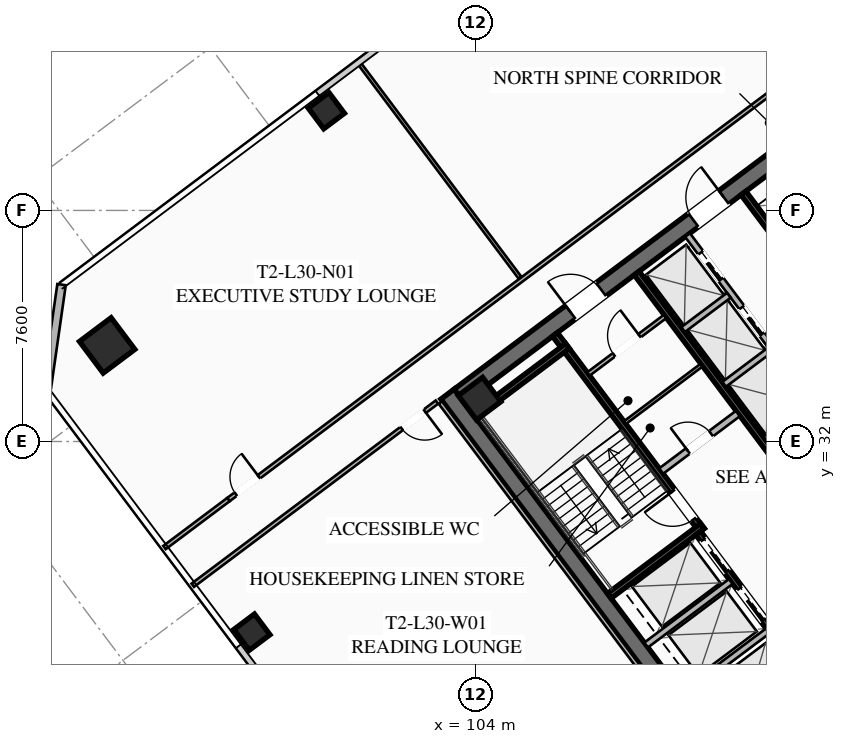
"""IFC4 building model, lengths in metres.
Left out: names, types, materials, properties, quantities, classifications, styles, units other than length and angle.
Written with IfcOpenShell. Run it as: python <this file> out.ifc"""

import sys

from ifc_helpers import new_model, si_unit, direction, frame, frame_2d, origin, origin_2d, place, context, subcontext, project, spatial, rectangle, hollow_rectangle, extrude, element, fill, save


model = new_model("IFC4")
c1 = context("Model", 3, precision=1e-05, world=origin(), true_north=direction((0.0, 1.0)))
c2 = subcontext(c1, "Body", "Model", "MODEL_VIEW")
j1 = project(units=[si_unit("LENGTHUNIT", "METRE"), si_unit("PLANEANGLEUNIT", "RADIAN")], contexts=[c1])
p1 = place(None, origin())
s1 = spatial("IfcSite", under=j1, at=p1, CompositionType="ELEMENT")
p2 = place(p1, origin())
s2 = spatial("IfcBuilding", under=s1, at=p2, CompositionType="ELEMENT")
p3 = place(p2, frame((0.0, 0.0, 114.4)))
s3 = spatial("IfcBuildingStorey", under=s2, at=p3, CompositionType="ELEMENT", Elevation=114.4)
p4 = place(p3, frame((112.436, 21.077, 0.0), z_axis=(0.0, 0.0, 1.0), x_axis=(-0.600005007985, 0.799996243986, 0.0)))
e1 = element("IfcWall", 1, at=p4, inside=s3, PredefinedType="SHEAR", context=c2, shape_type="SweptSolid", body=[
    extrude(rectangle(XDim=15.6, YDim=0.55, at=frame_2d((7.8, 0.0))), origin(), (0.0, 0.0, 1.0), 3.55),
])
p5 = place(p3, frame((124.539, 30.498, 0.0), z_axis=(0.0, 0.0, 1.0), x_axis=(-0.799998054672, -0.600002593761, 0.0)))
e2 = element("IfcWall", 2, at=p5, inside=s3, PredefinedType="SHEAR", context=c2, shape_type="SweptSolid", body=[
    extrude(rectangle(XDim=15.06, YDim=0.55, at=frame_2d((7.53, 0.0))), origin(), (0.0, 0.0, 1.0), 3.55),
])
p6 = place(p5, frame((9.23, 0.0, 0.0)))
e3 = element("IfcOpeningElement", 3, at=p6, cuts=e2, PredefinedType="OPENING", context=c2, shape_type="SweptSolid", body=[
    extrude(rectangle(XDim=1.25, YDim=2.25, at=frame_2d((0.625, 1.125))), frame((0.0, 0.285, 0.0), z_axis=(0.0, -1.0, 0.0), x_axis=(1.0, 0.0, 0.0)), (0.0, 0.0, 1.0), 0.57),
])
p7 = place(p5, frame((4.18, 0.0, 0.0)))
e4 = element("IfcOpeningElement", 4, at=p7, cuts=e2, PredefinedType="OPENING", context=c2, shape_type="SweptSolid", body=[
    extrude(rectangle(XDim=1.25, YDim=2.25, at=frame_2d((0.625, 1.125))), frame((0.0, 0.285, 0.0), z_axis=(0.0, -1.0, 0.0), x_axis=(1.0, 0.0, 0.0)), (0.0, 0.0, 1.0), 0.57),
])
p8 = place(p3, frame((103.461, 33.502, 0.0), z_axis=(0.0, 0.0, 1.0), x_axis=(0.799998054672, 0.600002593761, 0.0)))
e5 = element("IfcWall", 5, at=p8, inside=s3, PredefinedType="SHEAR", context=c2, shape_type="SweptSolid", body=[
    extrude(rectangle(XDim=15.06, YDim=0.55, at=frame_2d((7.53, 0.0))), origin(), (0.0, 0.0, 1.0), 3.55),
])
p9 = place(p8, frame((4.58, 0.0, 0.0)))
e6 = element("IfcOpeningElement", 6, at=p9, cuts=e5, PredefinedType="OPENING", context=c2, shape_type="SweptSolid", body=[
    extrude(rectangle(XDim=1.25, YDim=2.25, at=frame_2d((0.625, 1.125))), frame((0.0, 0.285, 0.0), z_axis=(0.0, -1.0, 0.0), x_axis=(1.0, 0.0, 0.0)), (0.0, 0.0, 1.0), 0.57),
])
p10 = place(p8, frame((9.63, 0.0, 0.0)))
e7 = element("IfcOpeningElement", 7, at=p10, cuts=e5, PredefinedType="OPENING", context=c2, shape_type="SweptSolid", body=[
    extrude(rectangle(XDim=1.25, YDim=2.25, at=frame_2d((0.625, 1.125))), frame((0.0, 0.285, 0.0), z_axis=(0.0, -1.0, 0.0), x_axis=(1.0, 0.0, 0.0)), (0.0, 0.0, 1.0), 0.57),
])
p11 = place(p3, frame((104.13, 33.41, 0.0), z_axis=(0.0, 0.0, 1.0), x_axis=(0.799999996291, 0.600000004945, 0.0)))
e8 = element("IfcColumn", 8, at=p11, inside=s3, PredefinedType="COLUMN", context=c2, shape_type="SweptSolid", body=[
    extrude(hollow_rectangle(XDim=1.0, YDim=1.0, WallThickness=0.04, at=origin_2d()), origin(), (0.0, 0.0, 1.0), 3.37),
])
p12 = place(p3, frame((91.88, 35.16, 0.0), z_axis=(0.0, 0.0, 1.0), x_axis=(0.799999996291, 0.600000004945, 0.0)))
e9 = element("IfcColumn", 9, at=p12, inside=s3, PredefinedType="COLUMN", context=c2, shape_type="SweptSolid", body=[
    extrude(hollow_rectangle(XDim=1.3, YDim=1.3, WallThickness=0.05, at=origin_2d()), origin(), (0.0, 0.0, 1.0), 3.37),
])
for number, where, z_axis, x_axis in (
    (10, (99.09, 42.88, 0.0), (0.0, 0.0, 1.0), (0.8, 0.6, 0.0)),
    (11, (96.64, 25.73, 0.0), (0.0, 0.0, 1.0), (0.8, 0.6, 0.0)),
):
    element("IfcColumn", number, at=place(p3, frame(where, z_axis=z_axis, x_axis=x_axis)), inside=s3, PredefinedType="COLUMN", context=c2, shape_type="SweptSolid", body=[
        extrude(hollow_rectangle(XDim=0.85, YDim=0.85, WallThickness=0.035, at=origin_2d()), origin(), (0.0, 0.0, 1.0), 3.37),
    ])
p13 = place(p3, frame((89.88, 33.66, 0.0), z_axis=(0.0, 0.0, 1.0), x_axis=(0.141421356237, 0.989949493661, 0.0)))
e12 = element("IfcWall", 12, at=p13, inside=s3, PredefinedType="SOLIDWALL", context=c2, shape_type="SweptSolid", body=[
    extrude(rectangle(XDim=3.536, YDim=0.28, at=frame_2d((1.768, 0.0))), origin(), (0.0, 0.0, 1.0), 3.37),
])
p14 = place(p3, frame((111.44, 29.08, 0.0), z_axis=(0.0, 0.0, 1.0), x_axis=(-0.59999029481, 0.8000072788, 0.0)))
e13 = element("IfcWall", 13, at=p14, inside=s3, PredefinedType="SHEAR", context=c2, shape_type="SweptSolid", body=[
    extrude(rectangle(XDim=8.05, YDim=0.2, at=frame_2d((4.025, 0.0))), origin(), (0.0, 0.0, 1.0), 3.37),
])
p15 = place(p14, frame((0.45, 0.0, 0.0)))
e14 = element("IfcOpeningElement", 14, at=p15, cuts=e13, PredefinedType="OPENING", context=c2, shape_type="SweptSolid", body=[
    extrude(rectangle(XDim=1.15, YDim=2.2, at=frame_2d((0.575, 1.1))), frame((0.0, 0.11, 0.0), z_axis=(0.0, -1.0, 0.0), x_axis=(1.0, 0.0, 0.0)), (0.0, 0.0, 1.0), 0.22),
])
for number, where, z_axis, x_axis in (
    (15, (108.396, 26.922, 0.0), (0.0, 0.0, 1.0), (0.8, 0.6, 0.0)),
    (16, (103.956, 32.842, 0.0), (0.0, 0.0, 1.0), (0.8, 0.6, 0.0)),
):
    element("IfcWall", number, at=place(p3, frame(where, z_axis=z_axis, x_axis=x_axis)), inside=s3, PredefinedType="SHEAR", context=c2, shape_type="SweptSolid", body=[
        extrude(rectangle(XDim=3.83, YDim=0.2, at=frame_2d((1.915, 0.0))), origin(), (0.0, 0.0, 1.0), 3.37),
    ])
p16 = place(p3, frame((117.998, 25.936, 0.0), z_axis=(0.0, 0.0, 1.0), x_axis=(-0.600002693989, 0.799997979501, 0.0)))
e17 = element("IfcWall", 17, at=p16, inside=s3, PredefinedType="SHEAR", context=c2, shape_type="SweptSolid", body=[
    extrude(rectangle(XDim=14.5, YDim=0.2, at=frame_2d((7.25, 0.0))), origin(), (0.0, 0.0, 1.0), 3.37),
])
p17 = place(p3, frame((110.104, 31.028, 0.0), z_axis=(0.0, 0.0, 1.0), x_axis=(0.800018601094, 0.59997519774, 0.0)))
e18 = element("IfcWall", 18, at=p17, inside=s3, PredefinedType="SOLIDWALL", context=c2, shape_type="SweptSolid", body=[
    extrude(rectangle(XDim=3.15, YDim=0.22, at=frame_2d((1.575, 0.0))), origin(), (0.0, 0.0, 1.0), 2.723),
])
p18 = place(p17, frame((1.1, 0.0, 0.0)))
e19 = element("IfcOpeningElement", 19, at=p18, cuts=e18, PredefinedType="OPENING", context=c2, shape_type="SweptSolid", body=[
    extrude(rectangle(XDim=0.95, YDim=2.05, at=frame_2d((0.475, 1.025))), frame((0.0, 0.12, 0.0), z_axis=(0.0, -1.0, 0.0), x_axis=(1.0, 0.0, 0.0)), (0.0, 0.0, 1.0), 0.24),
])
p19 = place(p3, frame((115.19, 23.83, 0.0), z_axis=(0.0, 0.0, 1.0), x_axis=(-0.599993943644, 0.800004542231, 0.0)))
e20 = element("IfcWall", 20, at=p19, inside=s3, PredefinedType="SHEAR", context=c2, shape_type="SweptSolid", body=[
    extrude(rectangle(XDim=6.45, YDim=0.2, at=frame_2d((3.225, 0.0))), origin(), (0.0, 0.0, 1.0), 3.37),
])
p20 = place(p19, frame((4.875, 0.0, 0.0)))
e21 = element("IfcOpeningElement", 21, at=p20, cuts=e20, PredefinedType="OPENING", context=c2, shape_type="SweptSolid", body=[
    extrude(rectangle(XDim=1.3, YDim=2.25, at=frame_2d((0.65, 1.125))), frame((0.0, 0.11, 0.0), z_axis=(0.0, -1.0, 0.0), x_axis=(1.0, 0.0, 0.0)), (0.0, 0.0, 1.0), 0.22),
])
p21 = place(p19, frame((2.875, 0.0, 0.0)))
e22 = element("IfcOpeningElement", 22, at=p21, cuts=e20, PredefinedType="OPENING", context=c2, shape_type="SweptSolid", body=[
    extrude(rectangle(XDim=1.3, YDim=2.25, at=frame_2d((0.65, 1.125))), frame((0.0, 0.11, 0.0), z_axis=(0.0, -1.0, 0.0), x_axis=(1.0, 0.0, 0.0)), (0.0, 0.0, 1.0), 0.22),
])
p22 = place(p19, frame((0.675, 0.0, 0.0)))
e23 = element("IfcOpeningElement", 23, at=p22, cuts=e20, PredefinedType="OPENING", context=c2, shape_type="SweptSolid", body=[
    extrude(rectangle(XDim=1.3, YDim=2.25, at=frame_2d((0.65, 1.125))), frame((0.0, 0.11, 0.0), z_axis=(0.0, -1.0, 0.0), x_axis=(1.0, 0.0, 0.0)), (0.0, 0.0, 1.0), 0.22),
])
for number, where, z_axis, x_axis in (
    (24, (110.826, 23.682, 0.0), (0.0, 0.0, 1.0), (0.8, 0.6, 0.0)),
    (25, (109.608, 25.306, 0.0), (0.0, 0.0, 1.0), (0.8, 0.6, 0.0)),
):
    element("IfcWall", number, at=place(p3, frame(where, z_axis=z_axis, x_axis=x_axis)), inside=s3, PredefinedType="SOLIDWALL", context=c2, shape_type="SweptSolid", body=[
        extrude(rectangle(XDim=3.48, YDim=0.2, at=frame_2d((1.74, 0.0))), origin(), (0.0, 0.0, 1.0), 3.37),
    ])
p23 = place(p3, frame((112.81, 40.17, 0.0), z_axis=(0.0, 0.0, 1.0), x_axis=(0.599993943644, -0.800004542231, 0.0)))
e26 = element("IfcWall", 26, at=p23, inside=s3, PredefinedType="SHEAR", context=c2, shape_type="SweptSolid", body=[
    extrude(rectangle(XDim=6.45, YDim=0.2, at=frame_2d((3.225, 0.0))), origin(), (0.0, 0.0, 1.0), 3.37),
])
p24 = place(p3, frame((107.71, 34.22, 0.0), z_axis=(0.0, 0.0, 1.0), x_axis=(0.799981399002, 0.60002480053, 0.0)))
e27 = element("IfcWall", 27, at=p24, inside=s3, PredefinedType="PARTITIONING", context=c2, shape_type="SweptSolid", body=[
    extrude(rectangle(XDim=3.15, YDim=0.135, at=frame_2d((1.575, 0.0))), origin(), (0.0, 0.0, 1.0), 2.723),
])
p25 = place(p24, frame((1.05, 0.0, 0.0)))
e28 = element("IfcOpeningElement", 28, at=p25, cuts=e27, PredefinedType="OPENING", context=c2, shape_type="SweptSolid", body=[
    extrude(rectangle(XDim=1.05, YDim=2.2, at=frame_2d((0.525, 1.1))), frame((0.0, 0.077, 0.0), z_axis=(0.0, -1.0, 0.0), x_axis=(1.0, 0.0, 0.0)), (0.0, 0.0, 1.0), 0.155),
])
p26 = place(p3, frame((108.91, 32.62, 0.0), z_axis=(0.0, 0.0, 1.0), x_axis=(0.800018601094, 0.59997519774, 0.0)))
e29 = element("IfcWall", 29, at=p26, inside=s3, PredefinedType="PARTITIONING", context=c2, shape_type="SweptSolid", body=[
    extrude(rectangle(XDim=3.15, YDim=0.11, at=frame_2d((1.575, 0.0))), origin(), (0.0, 0.0, 1.0), 2.723),
])
p27 = place(p3, frame((115.11, 33.27, 0.0), z_axis=(0.0, 0.0, 1.0), x_axis=(-0.600011322243, 0.799991508192, 0.0)))
e30 = element("IfcWall", 30, at=p27, inside=s3, PredefinedType="SOLIDWALL", context=c2, shape_type="SweptSolid", body=[
    extrude(rectangle(XDim=6.9, YDim=0.2, at=frame_2d((3.45, 0.0))), origin(), (0.0, 0.0, 1.0), 3.37),
])
p28 = place(p27, frame((0.575, 0.0, 0.0)))
e31 = element("IfcOpeningElement", 31, at=p28, cuts=e30, PredefinedType="OPENING", context=c2, shape_type="SweptSolid", body=[
    extrude(rectangle(XDim=1.1, YDim=2.2, at=frame_2d((0.55, 1.1))), frame((0.0, 0.11, 0.0), z_axis=(0.0, -1.0, 0.0), x_axis=(1.0, 0.0, 0.0)), (0.0, 0.0, 1.0), 0.22),
])
p29 = place(p27, frame((2.825, 0.0, 0.0)))
e32 = element("IfcOpeningElement", 32, at=p29, cuts=e30, PredefinedType="OPENING", context=c2, shape_type="SweptSolid", body=[
    extrude(rectangle(XDim=1.1, YDim=2.2, at=frame_2d((0.55, 1.1))), frame((0.0, 0.11, 0.0), z_axis=(0.0, -1.0, 0.0), x_axis=(1.0, 0.0, 0.0)), (0.0, 0.0, 1.0), 0.22),
])
p30 = place(p27, frame((5.075, 0.0, 0.0)))
e33 = element("IfcOpeningElement", 33, at=p30, cuts=e30, PredefinedType="OPENING", context=c2, shape_type="SweptSolid", body=[
    extrude(rectangle(XDim=1.1, YDim=2.2, at=frame_2d((0.55, 1.1))), frame((0.0, 0.11, 0.0), z_axis=(0.0, -1.0, 0.0), x_axis=(1.0, 0.0, 0.0)), (0.0, 0.0, 1.0), 0.22),
])
p31 = place(p3, frame((113.526, 32.082, 0.0), z_axis=(0.0, 0.0, 1.0), x_axis=(0.800046745961, 0.599937666993, 0.0)))
e34 = element("IfcWall", 34, at=p31, inside=s3, PredefinedType="SOLIDWALL", context=c2, shape_type="SweptSolid", body=[
    extrude(rectangle(XDim=1.88, YDim=0.2, at=frame_2d((0.94, 0.0))), origin(), (0.0, 0.0, 1.0), 3.37),
])
p32 = place(p3, frame((112.176, 33.882, 0.0), z_axis=(0.0, 0.0, 1.0), x_axis=(0.8, 0.6, 0.0)))
e35 = element("IfcWall", 35, at=p32, inside=s3, PredefinedType="SOLIDWALL", context=c2, shape_type="SweptSolid", body=[
    extrude(rectangle(XDim=1.88, YDim=0.2, at=frame_2d((0.94, 0.0))), origin(), (0.0, 0.0, 1.0), 3.37),
])
p33 = place(p3, frame((110.826, 35.682, 0.0), z_axis=(0.0, 0.0, 1.0), x_axis=(0.799984418148, 0.600020775241, 0.0)))
e36 = element("IfcWall", 36, at=p33, inside=s3, PredefinedType="SOLIDWALL", context=c2, shape_type="SweptSolid", body=[
    extrude(rectangle(XDim=1.88, YDim=0.2, at=frame_2d((0.94, 0.0))), origin(), (0.0, 0.0, 1.0), 3.37),
])
p34 = place(p3, frame((95.87, 30.09, 0.0), z_axis=(0.0, 0.0, 1.0), x_axis=(0.799997191971, 0.600003744021, 0.0)))
e37 = element("IfcWall", 37, at=p34, inside=s3, PredefinedType="PARTITIONING", context=c2, shape_type="SweptSolid", body=[
    extrude(rectangle(XDim=31.3, YDim=0.135, at=frame_2d((15.65, 0.0))), origin(), (0.0, 0.0, 1.0), 2.723),
])
p35 = place(p34, frame((0.3, 0.0, 0.0)))
e38 = element("IfcOpeningElement", 38, at=p35, cuts=e37, PredefinedType="OPENING", context=c2, shape_type="SweptSolid", body=[
    extrude(rectangle(XDim=0.95, YDim=2.05, at=frame_2d((0.475, 1.025))), frame((0.0, 0.077, 0.0), z_axis=(0.0, -1.0, 0.0), x_axis=(1.0, 0.0, 0.0)), (0.0, 0.0, 1.0), 0.155),
])
p36 = place(p34, frame((30.05, 0.0, 0.0)))
e39 = element("IfcOpeningElement", 39, at=p36, cuts=e37, PredefinedType="OPENING", context=c2, shape_type="SweptSolid", body=[
    extrude(rectangle(XDim=0.95, YDim=2.05, at=frame_2d((0.475, 1.025))), frame((0.0, 0.077, 0.0), z_axis=(0.0, -1.0, 0.0), x_axis=(1.0, 0.0, 0.0)), (0.0, 0.0, 1.0), 0.155),
])
p37 = place(p3, frame((93.766, 28.512, 0.0), z_axis=(0.0, 0.0, 1.0), x_axis=(0.799977721118, 0.600029704027, 0.0)))
e40 = element("IfcWall", 40, at=p37, inside=s3, PredefinedType="PARTITIONING", context=c2, shape_type="SweptSolid", body=[
    extrude(rectangle(XDim=2.63, YDim=0.135, at=frame_2d((1.315, 0.0))), origin(), (0.0, 0.0, 1.0), 2.723),
])
p38 = place(p3, frame((105.462, 37.384, 0.0), z_axis=(0.0, 0.0, 1.0), x_axis=(-0.599982344389, 0.800013241404, 0.0)))
e41 = element("IfcWall", 41, at=p38, inside=s3, PredefinedType="PARTITIONING", context=c2, shape_type="SweptSolid", body=[
    extrude(rectangle(XDim=8.85, YDim=0.11, at=frame_2d((4.425, 0.0))), origin(), (0.0, 0.0, 1.0), 2.723),
])
p39 = place(p3, frame((133.282, 32.374, 0.0), z_axis=(0.0, 0.0, 1.0), x_axis=(-0.8, -0.6, 0.0)))
e42 = element("IfcWall", 42, at=p39, inside=s3, PredefinedType="PARTITIONING", context=c2, shape_type="SweptSolid", body=[
    extrude(rectangle(XDim=31.3, YDim=0.135, at=frame_2d((15.65, 0.0))), origin(), (0.0, 0.0, 1.0), 2.723),
])
p40 = place(p39, frame((29.97, 0.0, 0.0)))
e43 = element("IfcOpeningElement", 43, at=p40, cuts=e42, PredefinedType="OPENING", context=c2, shape_type="SweptSolid", body=[
    extrude(rectangle(XDim=0.95, YDim=2.05, at=frame_2d((0.475, 1.025))), frame((0.0, 0.077, 0.0), z_axis=(0.0, -1.0, 0.0), x_axis=(1.0, 0.0, 0.0)), (0.0, 0.0, 1.0), 0.155),
])
p41 = place(p39, frame((19.151, 0.0, 0.0)))
e44 = element("IfcOpeningElement", 44, at=p41, cuts=e42, PredefinedType="OPENING", context=c2, shape_type="SweptSolid", body=[
    extrude(rectangle(XDim=0.95, YDim=2.05, at=frame_2d((0.475, 1.025))), frame((0.0, 0.077, 0.0), z_axis=(0.0, -1.0, 0.0), x_axis=(1.0, 0.0, 0.0)), (0.0, 0.0, 1.0), 0.155),
])
p42 = place(p39, frame((14.901, 0.0, 0.0)))
e45 = element("IfcOpeningElement", 45, at=p42, cuts=e42, PredefinedType="OPENING", context=c2, shape_type="SweptSolid", body=[
    extrude(rectangle(XDim=0.95, YDim=2.05, at=frame_2d((0.475, 1.025))), frame((0.0, 0.077, 0.0), z_axis=(0.0, -1.0, 0.0), x_axis=(1.0, 0.0, 0.0)), (0.0, 0.0, 1.0), 0.155),
])
p43 = place(p39, frame((10.92, 0.0, 0.0)))
e46 = element("IfcOpeningElement", 46, at=p43, cuts=e42, PredefinedType="OPENING", context=c2, shape_type="SweptSolid", body=[
    extrude(rectangle(XDim=0.95, YDim=2.05, at=frame_2d((0.475, 1.025))), frame((0.0, 0.077, 0.0), z_axis=(0.0, -1.0, 0.0), x_axis=(1.0, 0.0, 0.0)), (0.0, 0.0, 1.0), 0.155),
])
p44 = place(p39, frame((0.38, 0.0, 0.0)))
e47 = element("IfcOpeningElement", 47, at=p44, cuts=e42, PredefinedType="OPENING", context=c2, shape_type="SweptSolid", body=[
    extrude(rectangle(XDim=0.95, YDim=2.05, at=frame_2d((0.475, 1.025))), frame((0.0, 0.077, 0.0), z_axis=(0.0, -1.0, 0.0), x_axis=(1.0, 0.0, 0.0)), (0.0, 0.0, 1.0), 0.155),
])
p45 = place(p3, frame((112.104, 20.928, 0.0), z_axis=(0.0, 0.0, 1.0), x_axis=(-0.599994940075, 0.800003794918, 0.0)))
e48 = element("IfcWall", 48, at=p45, inside=s3, PredefinedType="PARTITIONING", context=c2, shape_type="SweptSolid", body=[
    extrude(rectangle(XDim=15.44, YDim=0.135, at=frame_2d((7.72, 0.0))), origin(), (0.0, 0.0, 1.0), 2.723),
])
p46 = place(p3, frame((102.728, 33.296, 0.0), z_axis=(0.0, 0.0, 1.0), x_axis=(-0.800002918023, -0.599996109283, 0.0)))
e49 = element("IfcWall", 49, at=p46, inside=s3, PredefinedType="PARTITIONING", context=c2, shape_type="SweptSolid", body=[
    extrude(rectangle(XDim=10.04, YDim=0.135, at=frame_2d((5.02, 0.0))), origin(), (0.0, 0.0, 1.0), 2.723),
])
p47 = place(p46, frame((0.5, 0.0, 0.0)))
e50 = element("IfcOpeningElement", 50, at=p47, cuts=e49, PredefinedType="OPENING", context=c2, shape_type="SweptSolid", body=[
    extrude(rectangle(XDim=0.95, YDim=2.05, at=frame_2d((0.475, 1.025))), frame((0.0, 0.077, 0.0), z_axis=(0.0, -1.0, 0.0), x_axis=(1.0, 0.0, 0.0)), (0.0, 0.0, 1.0), 0.155),
])
p48 = place(p9, origin())
e51 = element("IfcDoor", 51, at=p48, inside=s3, OperationType="SINGLE_SWING_LEFT", PredefinedType="DOOR", context=c2, shape_type="SweptSolid", body=[
    extrude(rectangle(XDim=1.25, YDim=2.25, at=frame_2d((0.625, 1.125))), frame((0.0, 0.025, 0.0), z_axis=(0.0, -1.0, 0.0), x_axis=(1.0, 0.0, 0.0)), (0.0, 0.0, 1.0), 0.05),
])
fill(e6, e51)
p49 = place(p10, origin())
e52 = element("IfcDoor", 52, at=p49, inside=s3, OperationType="SINGLE_SWING_RIGHT", PredefinedType="DOOR", context=c2, shape_type="SweptSolid", body=[
    extrude(rectangle(XDim=1.25, YDim=2.25, at=frame_2d((0.625, 1.125))), frame((0.0, 0.025, 0.0), z_axis=(0.0, -1.0, 0.0), x_axis=(1.0, 0.0, 0.0)), (0.0, 0.0, 1.0), 0.05),
])
fill(e7, e52)
p50 = place(p15, origin())
e53 = element("IfcDoor", 53, at=p50, inside=s3, OperationType="SINGLE_SWING_RIGHT", PredefinedType="DOOR", context=c2, shape_type="SweptSolid", body=[
    extrude(rectangle(XDim=1.15, YDim=2.2, at=frame_2d((0.575, 1.1))), frame((0.0, 0.025, 0.0), z_axis=(0.0, -1.0, 0.0), x_axis=(1.0, 0.0, 0.0)), (0.0, 0.0, 1.0), 0.05),
])
fill(e14, e53)
p51 = place(p25, origin())
e54 = element("IfcDoor", 54, at=p51, inside=s3, OperationType="SINGLE_SWING_RIGHT", PredefinedType="DOOR", context=c2, shape_type="SweptSolid", body=[
    extrude(rectangle(XDim=1.05, YDim=2.2, at=frame_2d((0.525, 1.1))), frame((0.0, 0.025, 0.0), z_axis=(0.0, -1.0, 0.0), x_axis=(1.0, 0.0, 0.0)), (0.0, 0.0, 1.0), 0.05),
])
fill(e28, e54)
p52 = place(p18, origin())
e55 = element("IfcDoor", 55, at=p52, inside=s3, OperationType="SINGLE_SWING_LEFT", PredefinedType="DOOR", context=c2, shape_type="SweptSolid", body=[
    extrude(rectangle(XDim=0.95, YDim=2.05, at=frame_2d((0.475, 1.025))), frame((0.0, 0.025, 0.0), z_axis=(0.0, -1.0, 0.0), x_axis=(1.0, 0.0, 0.0)), (0.0, 0.0, 1.0), 0.05),
])
fill(e19, e55)
p53 = place(p35, origin())
e56 = element("IfcDoor", 56, at=p53, inside=s3, OperationType="SINGLE_SWING_RIGHT", PredefinedType="DOOR", context=c2, shape_type="SweptSolid", body=[
    extrude(rectangle(XDim=0.95, YDim=2.05, at=frame_2d((0.475, 1.025))), frame((0.0, 0.025, 0.0), z_axis=(0.0, -1.0, 0.0), x_axis=(1.0, 0.0, 0.0)), (0.0, 0.0, 1.0), 0.05),
])
fill(e38, e56)
p54 = place(p47, origin())
e57 = element("IfcDoor", 57, at=p54, inside=s3, OperationType="SINGLE_SWING_LEFT", PredefinedType="DOOR", context=c2, shape_type="SweptSolid", body=[
    extrude(rectangle(XDim=0.95, YDim=2.05, at=frame_2d((0.475, 1.025))), frame((0.0, 0.025, 0.0), z_axis=(0.0, -1.0, 0.0), x_axis=(1.0, 0.0, 0.0)), (0.0, 0.0, 1.0), 0.05),
])
fill(e50, e57)
p55 = place(p20, origin())
e58 = element("IfcDoor", 58, at=p55, inside=s3, OperationType="SLIDING_TO_LEFT", PredefinedType="DOOR", context=c2, shape_type="SweptSolid", body=[
    extrude(rectangle(XDim=1.3, YDim=2.25, at=frame_2d((0.65, 1.125))), frame((0.0, 0.025, 0.0), z_axis=(0.0, -1.0, 0.0), x_axis=(1.0, 0.0, 0.0)), (0.0, 0.0, 1.0), 0.05),
])
fill(e21, e58)
p56 = place(p21, origin())
e59 = element("IfcDoor", 59, at=p56, inside=s3, OperationType="SLIDING_TO_LEFT", PredefinedType="DOOR", context=c2, shape_type="SweptSolid", body=[
    extrude(rectangle(XDim=1.3, YDim=2.25, at=frame_2d((0.65, 1.125))), frame((0.0, 0.025, 0.0), z_axis=(0.0, -1.0, 0.0), x_axis=(1.0, 0.0, 0.0)), (0.0, 0.0, 1.0), 0.05),
])
fill(e22, e59)
p57 = place(p29, origin())
e60 = element("IfcDoor", 60, at=p57, inside=s3, OperationType="SLIDING_TO_LEFT", PredefinedType="DOOR", context=c2, shape_type="SweptSolid", body=[
    extrude(rectangle(XDim=1.1, YDim=2.2, at=frame_2d((0.55, 1.1))), frame((0.0, 0.025, 0.0), z_axis=(0.0, -1.0, 0.0), x_axis=(1.0, 0.0, 0.0)), (0.0, 0.0, 1.0), 0.05),
])
fill(e32, e60)
p58 = place(p30, origin())
e61 = element("IfcDoor", 61, at=p58, inside=s3, OperationType="SLIDING_TO_LEFT", PredefinedType="DOOR", context=c2, shape_type="SweptSolid", body=[
    extrude(rectangle(XDim=1.1, YDim=2.2, at=frame_2d((0.55, 1.1))), frame((0.0, 0.025, 0.0), z_axis=(0.0, -1.0, 0.0), x_axis=(1.0, 0.0, 0.0)), (0.0, 0.0, 1.0), 0.05),
])
fill(e33, e61)
save(model, sys.argv[1])
